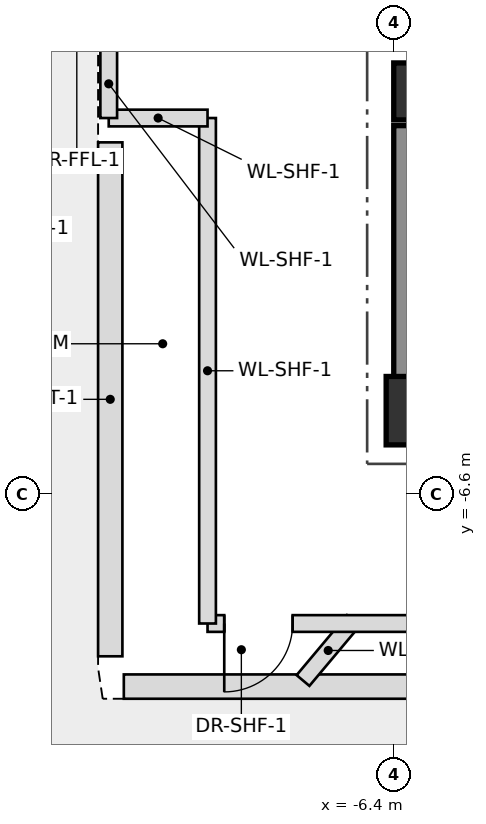
"""IFC4 building model, lengths in metres.
Left out: names, types, materials, properties, quantities, classifications, styles, units other than length and angle.
Written with IfcOpenShell. Run it as: python <this file> out.ifc"""

import sys

from ifc_helpers import new_model, si_unit, direction, frame, frame_2d, origin, origin_2d, place, context, subcontext, project, spatial, rectangle, extrude, source, transform, mapped, element, fill, save


model = new_model("IFC4")
c1 = context("Model", 3, precision=1e-05, world=origin(), true_north=direction((0.0, 1.0)))
c2 = subcontext(c1, "Body", "Model", "MODEL_VIEW")
j1 = project(units=[si_unit("LENGTHUNIT", "METRE"), si_unit("PLANEANGLEUNIT", "RADIAN")], contexts=[c1])
p1 = place(None, origin())
s1 = spatial("IfcSite", under=j1, at=p1, CompositionType="ELEMENT")
p2 = place(p1, origin())
s2 = spatial("IfcBuilding", under=s1, at=p2, CompositionType="ELEMENT")
p3 = place(p2, frame((0.0, 0.0, 84.8)))
s3 = spatial("IfcBuildingStorey", under=s2, at=p3, CompositionType="ELEMENT", Elevation=84.8)
m1 = source(origin(), c2, "Body", "SweptSolid", [
    extrude(rectangle(XDim=0.9, YDim=0.9, at=origin_2d()), origin(), (0.0, 0.0, 1.0), 5.1),
])
p4 = place(p3, frame((-6.05, -5.5, 0.0), z_axis=(0.0, 0.0, 1.0), x_axis=(1.0, 0.0, 0.0)))
e1 = element("IfcColumn", 1, at=p4, inside=s3, PredefinedType="COLUMN", context=c2, shape_type="MappedRepresentation", body=[
    mapped(m1, transform((0.0, 0.0, 0.0), scale=1.0)),
])
p5 = place(p3, frame((-6.4, -5.475, 0.0), z_axis=(0.0, 0.0, 1.0), x_axis=(1.0, 0.0, 0.0)))
e2 = element("IfcWall", 2, at=p5, inside=s3, PredefinedType="SHEAR", context=c2, shape_type="SweptSolid", body=[
    extrude(rectangle(XDim=12.8, YDim=0.75, at=frame_2d((6.4, 0.0))), origin(), (0.0, 0.0, 1.0), 5.1),
])
p6 = place(p5, frame((8.6, 0.0, 0.0)))
e3 = element("IfcOpeningElement", 3, at=p6, cuts=e2, PredefinedType="OPENING", context=c2, shape_type="SweptSolid", body=[
    extrude(rectangle(XDim=1.2, YDim=2.2, at=frame_2d((0.6, 1.1))), frame((0.0, 0.385, 0.0), z_axis=(0.0, -1.0, 0.0), x_axis=(1.0, 0.0, 0.0)), (0.0, 0.0, 1.0), 0.77),
])
p7 = place(p3, frame((-6.025, -5.1, 0.0), z_axis=(0.0, 0.0, 1.0), x_axis=(0.0, 1.0, 0.0)))
e4 = element("IfcWall", 4, at=p7, inside=s3, PredefinedType="SHEAR", context=c2, shape_type="SweptSolid", body=[
    extrude(rectangle(XDim=3.35, YDim=0.75, at=frame_2d((1.675, 0.0))), origin(), (0.0, 0.0, 1.0), 5.1),
])
m2 = source(origin(), c2, "Body", "SweptSolid", [
    extrude(rectangle(XDim=0.75, YDim=0.75, at=origin_2d()), origin(), (0.0, 0.0, 1.0), 5.1),
])
p8 = place(p3, frame((-6.025, -1.3, 0.0), z_axis=(0.0, 0.0, 1.0), x_axis=(1.0, 0.0, 0.0)))
e5 = element("IfcColumn", 5, at=p8, inside=s3, PredefinedType="COLUMN", context=c2, shape_type="MappedRepresentation", body=[
    mapped(m2, transform((0.0, 0.0, 0.0), scale=1.0)),
])
p9 = place(p3, frame((3.801, -9.13, 0.0), z_axis=(0.0, 0.0, 1.0), x_axis=(-1.0, 0.0, 0.0)))
e6 = element("IfcWall", 6, at=p9, inside=s3, PredefinedType="SOLIDWALL", context=c2, shape_type="SweptSolid", body=[
    extrude(rectangle(XDim=13.753, YDim=0.32, at=frame_2d((6.876, 0.0))), origin(), (0.0, 0.0, 1.0), 4.895),
])
p10 = place(p3, frame((-10.13, -8.731, 0.0), z_axis=(0.0, 0.0, 1.0), x_axis=(0.0, 1.0, 0.0)))
e7 = element("IfcWall", 7, at=p10, inside=s3, PredefinedType="SOLIDWALL", context=c2, shape_type="SweptSolid", body=[
    extrude(rectangle(XDim=6.761, YDim=0.32, at=frame_2d((3.381, 0.0))), origin(), (0.0, 0.0, 1.0), 3.55),
])
p11 = place(p3, frame((-6.931, -8.26, 0.0), z_axis=(0.0, 0.0, 1.0), x_axis=(-0.642881168458, -0.765965928251, 0.0)))
e8 = element("IfcWall", 8, at=p11, inside=s3, PredefinedType="PLUMBINGWALL", context=c2, shape_type="SweptSolid", body=[
    extrude(rectangle(XDim=1.031, YDim=0.22, at=frame_2d((0.516, 0.0))), origin(), (0.0, 0.0, 1.0), 4.895),
])
p12 = place(p3, frame((3.8, -8.3, 0.0), z_axis=(0.0, 0.0, 1.0), x_axis=(-1.0, 0.0, 0.0)))
e9 = element("IfcWall", 9, at=p12, inside=s3, PredefinedType="PLUMBINGWALL", context=c2, shape_type="SweptSolid", body=[
    extrude(rectangle(XDim=12.65, YDim=0.22, at=frame_2d((6.325, 0.0))), origin(), (0.0, 0.0, 1.0), 4.895),
])
p13 = place(p12, frame((11.53, 0.0, 0.0)))
e10 = element("IfcOpeningElement", 10, at=p13, cuts=e9, PredefinedType="OPENING", context=c2, shape_type="SweptSolid", body=[
    extrude(rectangle(XDim=0.9, YDim=2.05, at=frame_2d((0.45, 1.025))), frame((0.0, 0.12, 0.0), z_axis=(0.0, -1.0, 0.0), x_axis=(1.0, 0.0, 0.0)), (0.0, 0.0, 1.0), 0.24),
])
p14 = place(p3, frame((-8.85, -8.3, 0.0), z_axis=(0.0, 0.0, 1.0), x_axis=(0.0, 1.0, 0.0)))
e11 = element("IfcWall", 11, at=p14, inside=s3, PredefinedType="PLUMBINGWALL", context=c2, shape_type="SweptSolid", body=[
    extrude(rectangle(XDim=6.65, YDim=0.22, at=frame_2d((3.325, 0.0))), origin(), (0.0, 0.0, 1.0), 3.55),
])
p15 = place(p3, frame((-8.85, -1.65, 0.0), z_axis=(0.0, 0.0, 1.0), x_axis=(-1.0, 0.0, 0.0)))
e12 = element("IfcWall", 12, at=p15, inside=s3, PredefinedType="PLUMBINGWALL", context=c2, shape_type="SweptSolid", body=[
    extrude(rectangle(XDim=1.3, YDim=0.22, at=frame_2d((0.65, 0.0))), origin(), (0.0, 0.0, 1.0), 4.895),
])
p16 = place(p3, frame((-10.15, -1.65, 0.0), z_axis=(0.0, 0.0, 1.0), x_axis=(0.0, 1.0, 0.0)))
e13 = element("IfcWall", 13, at=p16, inside=s3, PredefinedType="PLUMBINGWALL", context=c2, shape_type="SweptSolid", body=[
    extrude(rectangle(XDim=3.3, YDim=0.22, at=frame_2d((1.65, 0.0))), origin(), (0.0, 0.0, 1.0), 4.895),
])
p17 = place(p16, frame((1.05, 0.0, 0.0)))
e14 = element("IfcOpeningElement", 14, at=p17, cuts=e13, PredefinedType="OPENING", context=c2, shape_type="SweptSolid", body=[
    extrude(rectangle(XDim=1.2, YDim=2.2, at=frame_2d((0.6, 1.1))), frame((0.0, 0.12, 0.0), z_axis=(0.0, -1.0, 0.0), x_axis=(1.0, 0.0, 0.0)), (0.0, 0.0, 1.0), 0.24),
])
p18 = place(p13, origin())
e15 = element("IfcDoor", 15, at=p18, inside=s3, OperationType="SINGLE_SWING_RIGHT", PredefinedType="DOOR", context=c2, shape_type="SweptSolid", body=[
    extrude(rectangle(XDim=0.9, YDim=2.05, at=frame_2d((0.45, 1.025))), frame((0.0, 0.025, 0.0), z_axis=(0.0, -1.0, 0.0), x_axis=(1.0, 0.0, 0.0)), (0.0, 0.0, 1.0), 0.05),
])
fill(e10, e15)
save(model, sys.argv[1])
